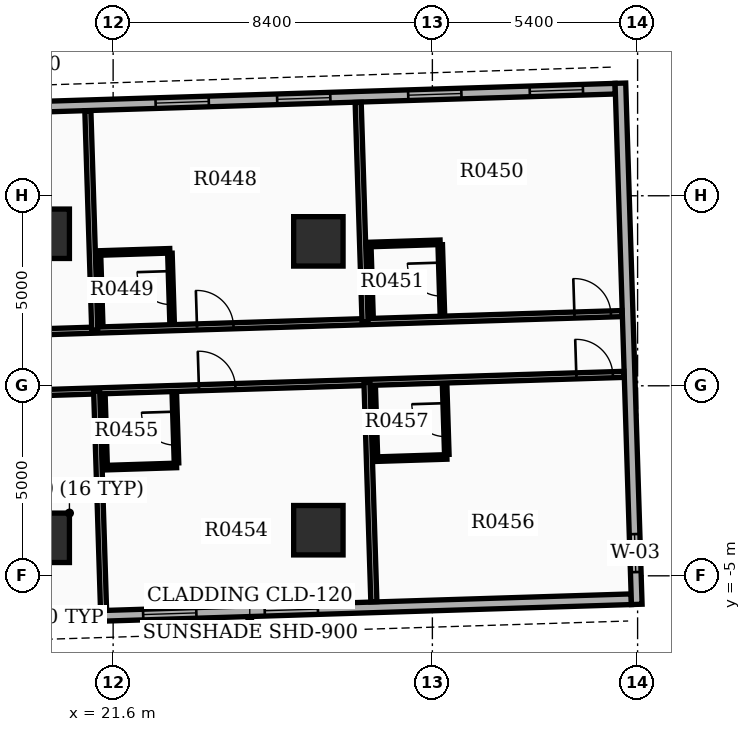
"""IFC4 building model, lengths in metres.
Left out: names, types, materials, properties, quantities, classifications, styles, units other than length and angle.
Written with IfcOpenShell. Run it as: python <this file> out.ifc"""

import sys

from ifc_helpers import new_model, si_unit, direction, frame, frame_2d, origin, origin_2d, place, context, subcontext, project, spatial, rectangle, extrude, element, fill, save


model = new_model("IFC4")
c1 = context("Model", 3, precision=1e-05, world=origin(), true_north=direction((0.0, 1.0)))
c2 = subcontext(c1, "Body", "Model", "MODEL_VIEW")
j1 = project(units=[si_unit("LENGTHUNIT", "METRE"), si_unit("PLANEANGLEUNIT", "RADIAN")], contexts=[c1])
p1 = place(None, origin())
s1 = spatial("IfcSite", under=j1, at=p1, CompositionType="ELEMENT")
p2 = place(p1, origin())
s2 = spatial("IfcBuilding", under=s1, at=p2, CompositionType="ELEMENT")
p3 = place(p2, frame((0.0, 0.0, 31.5)))
s3 = spatial("IfcBuildingStorey", under=s2, at=p3, CompositionType="ELEMENT", Elevation=31.5)
for number, where, z_axis, x_axis in (
    (1, (19.8, -4.0, 0.0), (0.0, 0.0, 1.0), (1.0, 0.0, 0.0)),
    (2, (19.8, 4.0, 0.0), (0.0, 0.0, 1.0), (1.0, 0.0, 0.0)),
    (3, (27.0, -3.8, 0.0), (0.0, 0.0, 1.0), (1.0, 0.0, 0.0)),
    (4, (27.0, 3.8, 0.0), (0.0, 0.0, 1.0), (1.0, 0.0, 0.0)),
):
    element("IfcColumn", number, at=place(p3, frame(where, z_axis=z_axis, x_axis=x_axis)), inside=s3, PredefinedType="COLUMN", context=c2, shape_type="SweptSolid", body=[
        extrude(rectangle(XDim=1.3, YDim=1.3, at=origin_2d()), origin(), (0.0, 0.0, 1.0), 3.9),
    ])
p4 = place(p3, frame((15.144, -6.247, 0.0), z_axis=(0.0, 0.0, 1.0), x_axis=(0.999506955354, 0.031398187845, 0.0)))
e5 = element("IfcWall", 5, at=p4, inside=s3, PredefinedType="STANDARD", context=c2, shape_type="SweptSolid", body=[
    extrude(rectangle(XDim=20.1, YDim=0.28, at=frame_2d((10.05, 0.0))), origin(), (0.0, 0.0, 1.0), 2.91),
])
p5 = place(p4, frame((0.85, 0.0, 0.8)))
e6 = element("IfcOpeningElement", 6, at=p5, cuts=e5, PredefinedType="OPENING", context=c2, shape_type="SweptSolid", body=[
    extrude(rectangle(XDim=1.4, YDim=1.6, at=frame_2d((0.7, 0.8))), frame((0.0, 0.15, 0.0), z_axis=(0.0, -1.0, 0.0), x_axis=(1.0, 0.0, 0.0)), (0.0, 0.0, 1.0), 0.3),
])
p6 = place(p4, frame((4.05, 0.0, 0.8)))
e7 = element("IfcOpeningElement", 7, at=p6, cuts=e5, PredefinedType="OPENING", context=c2, shape_type="SweptSolid", body=[
    extrude(rectangle(XDim=1.4, YDim=1.6, at=frame_2d((0.7, 0.8))), frame((0.0, 0.15, 0.0), z_axis=(0.0, -1.0, 0.0), x_axis=(1.0, 0.0, 0.0)), (0.0, 0.0, 1.0), 0.3),
])
p7 = place(p4, frame((7.25, 0.0, 0.8)))
e8 = element("IfcOpeningElement", 8, at=p7, cuts=e5, PredefinedType="OPENING", context=c2, shape_type="SweptSolid", body=[
    extrude(rectangle(XDim=1.4, YDim=1.6, at=frame_2d((0.7, 0.8))), frame((0.0, 0.15, 0.0), z_axis=(0.0, -1.0, 0.0), x_axis=(1.0, 0.0, 0.0)), (0.0, 0.0, 1.0), 0.3),
])
p8 = place(p4, frame((10.45, 0.0, 0.8)))
e9 = element("IfcOpeningElement", 9, at=p8, cuts=e5, PredefinedType="OPENING", context=c2, shape_type="SweptSolid", body=[
    extrude(rectangle(XDim=1.4, YDim=1.6, at=frame_2d((0.7, 0.8))), frame((0.0, 0.15, 0.0), z_axis=(0.0, -1.0, 0.0), x_axis=(1.0, 0.0, 0.0)), (0.0, 0.0, 1.0), 0.3),
])
p9 = place(p3, frame((34.812, 7.817, 0.0), z_axis=(0.0, 0.0, 1.0), x_axis=(-0.999506574096, -0.031410322165, 0.0)))
e10 = element("IfcWall", 10, at=p9, inside=s3, PredefinedType="STANDARD", context=c2, shape_type="SweptSolid", body=[
    extrude(rectangle(XDim=20.1, YDim=0.28, at=frame_2d((10.05, 0.0))), origin(), (0.0, 0.0, 1.0), 2.91),
])
p10 = place(p9, frame((0.85, 0.0, 0.8)))
e11 = element("IfcOpeningElement", 11, at=p10, cuts=e10, PredefinedType="OPENING", context=c2, shape_type="SweptSolid", body=[
    extrude(rectangle(XDim=1.4, YDim=1.6, at=frame_2d((0.7, 0.8))), frame((0.0, 0.15, 0.0), z_axis=(0.0, -1.0, 0.0), x_axis=(1.0, 0.0, 0.0)), (0.0, 0.0, 1.0), 0.3),
])
p11 = place(p9, frame((4.05, 0.0, 0.8)))
e12 = element("IfcOpeningElement", 12, at=p11, cuts=e10, PredefinedType="OPENING", context=c2, shape_type="SweptSolid", body=[
    extrude(rectangle(XDim=1.4, YDim=1.6, at=frame_2d((0.7, 0.8))), frame((0.0, 0.15, 0.0), z_axis=(0.0, -1.0, 0.0), x_axis=(1.0, 0.0, 0.0)), (0.0, 0.0, 1.0), 0.3),
])
p12 = place(p9, frame((7.5, 0.0, 0.8)))
e13 = element("IfcOpeningElement", 13, at=p12, cuts=e10, PredefinedType="OPENING", context=c2, shape_type="SweptSolid", body=[
    extrude(rectangle(XDim=1.4, YDim=1.6, at=frame_2d((0.7, 0.8))), frame((0.0, 0.15, 0.0), z_axis=(0.0, -1.0, 0.0), x_axis=(1.0, 0.0, 0.0)), (0.0, 0.0, 1.0), 0.3),
])
p13 = place(p9, frame((10.7, 0.0, 0.8)))
e14 = element("IfcOpeningElement", 14, at=p13, cuts=e10, PredefinedType="OPENING", context=c2, shape_type="SweptSolid", body=[
    extrude(rectangle(XDim=1.4, YDim=1.6, at=frame_2d((0.7, 0.8))), frame((0.0, 0.15, 0.0), z_axis=(0.0, -1.0, 0.0), x_axis=(1.0, 0.0, 0.0)), (0.0, 0.0, 1.0), 0.3),
])
p14 = place(p9, frame((15.0, 0.0, 0.0)))
e15 = element("IfcOpeningElement", 15, at=p14, cuts=e10, PredefinedType="OPENING", context=c2, shape_type="SweptSolid", body=[
    extrude(rectangle(XDim=0.96, YDim=2.1, at=frame_2d((0.48, 1.05))), frame((0.0, 0.15, 0.0), z_axis=(0.0, -1.0, 0.0), x_axis=(1.0, 0.0, 0.0)), (0.0, 0.0, 1.0), 0.3),
])
p15 = place(p3, frame((35.378, -5.752, 0.0), z_axis=(0.0, 0.0, 1.0), x_axis=(-0.031406966164, 0.999506679556, 0.0)))
e16 = element("IfcWall", 16, at=p15, inside=s3, PredefinedType="STANDARD", context=c2, shape_type="SweptSolid", body=[
    extrude(rectangle(XDim=13.72, YDim=0.28, at=frame_2d((6.86, 0.0))), origin(), (0.0, 0.0, 1.0), 2.91),
])
p16 = place(p15, frame((0.85, 0.0, 0.85)))
e17 = element("IfcOpeningElement", 17, at=p16, cuts=e16, PredefinedType="OPENING", context=c2, shape_type="SweptSolid", body=[
    extrude(rectangle(XDim=1.0, YDim=1.5, at=frame_2d((0.5, 0.75))), frame((0.0, 0.15, 0.0), z_axis=(0.0, -1.0, 0.0), x_axis=(1.0, 0.0, 0.0)), (0.0, 0.0, 1.0), 0.3),
])
p17 = place(p3, frame((14.817, 1.266, 0.0), z_axis=(0.0, 0.0, 1.0), x_axis=(0.9995067864, 0.031403565719, 0.0)))
e18 = element("IfcWall", 18, at=p17, inside=s3, PredefinedType="PARTITIONING", context=c2, shape_type="SweptSolid", body=[
    extrude(rectangle(XDim=20.182, YDim=0.16, at=frame_2d((10.091, 0.0))), origin(), (0.0, 0.0, 1.0), 2.9),
])
p18 = place(p17, frame((2.61, 0.0, 0.0)))
e19 = element("IfcOpeningElement", 19, at=p18, cuts=e18, PredefinedType="OPENING", context=c2, shape_type="SweptSolid", body=[
    extrude(rectangle(XDim=0.96, YDim=2.15, at=frame_2d((0.48, 1.075))), frame((0.0, 0.09, 0.0), z_axis=(0.0, -1.0, 0.0), x_axis=(1.0, 0.0, 0.0)), (0.0, 0.0, 1.0), 0.18),
])
p19 = place(p17, frame((8.994, 0.0, 0.0)))
e20 = element("IfcOpeningElement", 20, at=p19, cuts=e18, PredefinedType="OPENING", context=c2, shape_type="SweptSolid", body=[
    extrude(rectangle(XDim=0.96, YDim=2.15, at=frame_2d((0.48, 1.075))), frame((0.0, 0.09, 0.0), z_axis=(0.0, -1.0, 0.0), x_axis=(1.0, 0.0, 0.0)), (0.0, 0.0, 1.0), 0.18),
])
p20 = place(p17, frame((18.93, 0.0, 0.0)))
e21 = element("IfcOpeningElement", 21, at=p20, cuts=e18, PredefinedType="OPENING", context=c2, shape_type="SweptSolid", body=[
    extrude(rectangle(XDim=0.96, YDim=2.15, at=frame_2d((0.48, 1.075))), frame((0.0, 0.09, 0.0), z_axis=(0.0, -1.0, 0.0), x_axis=(1.0, 0.0, 0.0)), (0.0, 0.0, 1.0), 0.18),
])
p21 = place(p3, frame((21.116, 1.464, 0.0), z_axis=(0.0, 0.0, 1.0), x_axis=(-0.031427548972, 0.999506032581, 0.0)))
e22 = element("IfcWall", 22, at=p21, inside=s3, PredefinedType="PARTITIONING", context=c2, shape_type="SweptSolid", body=[
    extrude(rectangle(XDim=5.772, YDim=0.16, at=frame_2d((2.886, 0.0))), origin(), (0.0, 0.0, 1.0), 2.9),
])
p22 = place(p3, frame((28.229, 1.688, 0.0), z_axis=(0.0, 0.0, 1.0), x_axis=(-0.031426220357, 0.999506074356, 0.0)))
e23 = element("IfcWall", 23, at=p22, inside=s3, PredefinedType="PARTITIONING", context=c2, shape_type="SweptSolid", body=[
    extrude(rectangle(XDim=5.772, YDim=0.16, at=frame_2d((2.886, 0.0))), origin(), (0.0, 0.0, 1.0), 2.9),
])
p23 = place(p3, frame((23.151, 1.668, 0.0), z_axis=(0.0, 0.0, 1.0), x_axis=(-0.031255692016, 0.999511421504, 0.0)))
e24 = element("IfcWall", 24, at=p23, inside=s3, PredefinedType="PARTITIONING", context=c2, shape_type="SweptSolid", body=[
    extrude(rectangle(XDim=1.82, YDim=0.12, at=frame_2d((0.91, 0.0))), origin(), (0.0, 0.0, 1.0), 2.9),
])
p24 = place(p23, frame((0.47, 0.0, 0.0)))
e25 = element("IfcOpeningElement", 25, at=p24, cuts=e24, PredefinedType="OPENING", context=c2, shape_type="SweptSolid", body=[
    extrude(rectangle(XDim=0.88, YDim=2.1, at=frame_2d((0.44, 1.05))), frame((0.0, 0.07, 0.0), z_axis=(0.0, -1.0, 0.0), x_axis=(1.0, 0.0, 0.0)), (0.0, 0.0, 1.0), 0.14),
])
p25 = place(p3, frame((21.272, 1.609, 0.0), z_axis=(0.0, 0.0, 1.0), x_axis=(-0.031389704724, 0.999507221803, 0.0)))
e26 = element("IfcWall", 26, at=p25, inside=s3, PredefinedType="PARTITIONING", context=c2, shape_type="SweptSolid", body=[
    extrude(rectangle(XDim=1.82, YDim=0.12, at=frame_2d((0.91, 0.0))), origin(), (0.0, 0.0, 1.0), 2.9),
])
p26 = place(p3, frame((21.213, 3.493, 0.0), z_axis=(0.0, 0.0, 1.0), x_axis=(0.999506103526, 0.031425292588, 0.0)))
e27 = element("IfcWall", 27, at=p26, inside=s3, PredefinedType="PARTITIONING", context=c2, shape_type="SweptSolid", body=[
    extrude(rectangle(XDim=1.88, YDim=0.12, at=frame_2d((0.94, 0.0))), origin(), (0.0, 0.0, 1.0), 2.9),
])
p27 = place(p3, frame((30.263, 1.892, 0.0), z_axis=(0.0, 0.0, 1.0), x_axis=(-0.031389704724, 0.999507221803, 0.0)))
e28 = element("IfcWall", 28, at=p27, inside=s3, PredefinedType="PARTITIONING", context=c2, shape_type="SweptSolid", body=[
    extrude(rectangle(XDim=1.82, YDim=0.12, at=frame_2d((0.91, 0.0))), origin(), (0.0, 0.0, 1.0), 2.9),
])
p28 = place(p27, frame((0.47, 0.0, 0.0)))
e29 = element("IfcOpeningElement", 29, at=p28, cuts=e28, PredefinedType="OPENING", context=c2, shape_type="SweptSolid", body=[
    extrude(rectangle(XDim=0.88, YDim=2.1, at=frame_2d((0.44, 1.05))), frame((0.0, 0.07, 0.0), z_axis=(0.0, -1.0, 0.0), x_axis=(1.0, 0.0, 0.0)), (0.0, 0.0, 1.0), 0.14),
])
p29 = place(p3, frame((28.385, 1.833, 0.0), z_axis=(0.0, 0.0, 1.0), x_axis=(-0.031389704724, 0.999507221803, 0.0)))
e30 = element("IfcWall", 30, at=p29, inside=s3, PredefinedType="PARTITIONING", context=c2, shape_type="SweptSolid", body=[
    extrude(rectangle(XDim=1.82, YDim=0.12, at=frame_2d((0.91, 0.0))), origin(), (0.0, 0.0, 1.0), 2.9),
])
p30 = place(p3, frame((28.325, 3.717, 0.0), z_axis=(0.0, 0.0, 1.0), x_axis=(0.999506103526, 0.031425292588, 0.0)))
e31 = element("IfcWall", 31, at=p30, inside=s3, PredefinedType="PARTITIONING", context=c2, shape_type="SweptSolid", body=[
    extrude(rectangle(XDim=1.88, YDim=0.12, at=frame_2d((0.94, 0.0))), origin(), (0.0, 0.0, 1.0), 2.9),
])
p31 = place(p3, frame((14.868, -0.333, 0.0), z_axis=(0.0, 0.0, 1.0), x_axis=(0.99950639469, 0.031416030536, 0.0)))
e32 = element("IfcWall", 32, at=p31, inside=s3, PredefinedType="PARTITIONING", context=c2, shape_type="SweptSolid", body=[
    extrude(rectangle(XDim=20.182, YDim=0.16, at=frame_2d((10.091, 0.0))), origin(), (0.0, 0.0, 1.0), 2.9),
])
p32 = place(p31, frame((2.61, 0.0, 0.0)))
e33 = element("IfcOpeningElement", 33, at=p32, cuts=e32, PredefinedType="OPENING", context=c2, shape_type="SweptSolid", body=[
    extrude(rectangle(XDim=0.96, YDim=2.15, at=frame_2d((0.48, 1.075))), frame((0.0, 0.09, 0.0), z_axis=(0.0, -1.0, 0.0), x_axis=(1.0, 0.0, 0.0)), (0.0, 0.0, 1.0), 0.18),
])
p33 = place(p31, frame((8.994, 0.0, 0.0)))
e34 = element("IfcOpeningElement", 34, at=p33, cuts=e32, PredefinedType="OPENING", context=c2, shape_type="SweptSolid", body=[
    extrude(rectangle(XDim=0.96, YDim=2.15, at=frame_2d((0.48, 1.075))), frame((0.0, 0.09, 0.0), z_axis=(0.0, -1.0, 0.0), x_axis=(1.0, 0.0, 0.0)), (0.0, 0.0, 1.0), 0.18),
])
p34 = place(p31, frame((18.93, 0.0, 0.0)))
e35 = element("IfcOpeningElement", 35, at=p34, cuts=e32, PredefinedType="OPENING", context=c2, shape_type="SweptSolid", body=[
    extrude(rectangle(XDim=0.96, YDim=2.15, at=frame_2d((0.48, 1.075))), frame((0.0, 0.09, 0.0), z_axis=(0.0, -1.0, 0.0), x_axis=(1.0, 0.0, 0.0)), (0.0, 0.0, 1.0), 0.18),
])
p35 = place(p3, frame((21.167, -0.135, 0.0), z_axis=(0.0, 0.0, 1.0), x_axis=(0.031385292484, -0.999507360361, 0.0)))
e36 = element("IfcWall", 36, at=p35, inside=s3, PredefinedType="PARTITIONING", context=c2, shape_type="SweptSolid", body=[
    extrude(rectangle(XDim=5.772, YDim=0.16, at=frame_2d((2.886, 0.0))), origin(), (0.0, 0.0, 1.0), 2.9),
])
p36 = place(p3, frame((28.279, 0.088, 0.0), z_axis=(0.0, 0.0, 1.0), x_axis=(0.031383965651, -0.999507402024, 0.0)))
e37 = element("IfcWall", 37, at=p36, inside=s3, PredefinedType="PARTITIONING", context=c2, shape_type="SweptSolid", body=[
    extrude(rectangle(XDim=5.772, YDim=0.16, at=frame_2d((2.886, 0.0))), origin(), (0.0, 0.0, 1.0), 2.9),
])
p37 = place(p3, frame((23.267, -2.03, 0.0), z_axis=(0.0, 0.0, 1.0), x_axis=(-0.031255692016, 0.999511421504, 0.0)))
e38 = element("IfcWall", 38, at=p37, inside=s3, PredefinedType="PARTITIONING", context=c2, shape_type="SweptSolid", body=[
    extrude(rectangle(XDim=1.82, YDim=0.12, at=frame_2d((0.91, 0.0))), origin(), (0.0, 0.0, 1.0), 2.9),
])
p38 = place(p37, frame((0.47, 0.0, 0.0)))
e39 = element("IfcOpeningElement", 39, at=p38, cuts=e38, PredefinedType="OPENING", context=c2, shape_type="SweptSolid", body=[
    extrude(rectangle(XDim=0.88, YDim=2.1, at=frame_2d((0.44, 1.05))), frame((0.0, 0.07, 0.0), z_axis=(0.0, -1.0, 0.0), x_axis=(1.0, 0.0, 0.0)), (0.0, 0.0, 1.0), 0.14),
])
p39 = place(p3, frame((21.388, -2.089, 0.0), z_axis=(0.0, 0.0, 1.0), x_axis=(-0.031389704724, 0.999507221803, 0.0)))
e40 = element("IfcWall", 40, at=p39, inside=s3, PredefinedType="PARTITIONING", context=c2, shape_type="SweptSolid", body=[
    extrude(rectangle(XDim=1.82, YDim=0.12, at=frame_2d((0.91, 0.0))), origin(), (0.0, 0.0, 1.0), 2.9),
])
p40 = place(p3, frame((21.39, -2.154, 0.0), z_axis=(0.0, 0.0, 1.0), x_axis=(0.999506103526, 0.031425292588, 0.0)))
e41 = element("IfcWall", 41, at=p40, inside=s3, PredefinedType="PARTITIONING", context=c2, shape_type="SweptSolid", body=[
    extrude(rectangle(XDim=1.88, YDim=0.12, at=frame_2d((0.94, 0.0))), origin(), (0.0, 0.0, 1.0), 2.9),
])
p41 = place(p3, frame((30.38, -1.807, 0.0), z_axis=(0.0, 0.0, 1.0), x_axis=(-0.031389704724, 0.999507221803, 0.0)))
e42 = element("IfcWall", 42, at=p41, inside=s3, PredefinedType="PARTITIONING", context=c2, shape_type="SweptSolid", body=[
    extrude(rectangle(XDim=1.82, YDim=0.12, at=frame_2d((0.91, 0.0))), origin(), (0.0, 0.0, 1.0), 2.9),
])
p42 = place(p41, frame((0.47, 0.0, 0.0)))
e43 = element("IfcOpeningElement", 43, at=p42, cuts=e42, PredefinedType="OPENING", context=c2, shape_type="SweptSolid", body=[
    extrude(rectangle(XDim=0.88, YDim=2.1, at=frame_2d((0.44, 1.05))), frame((0.0, 0.07, 0.0), z_axis=(0.0, -1.0, 0.0), x_axis=(1.0, 0.0, 0.0)), (0.0, 0.0, 1.0), 0.14),
])
p43 = place(p3, frame((28.501, -1.866, 0.0), z_axis=(0.0, 0.0, 1.0), x_axis=(-0.031389704724, 0.999507221803, 0.0)))
e44 = element("IfcWall", 44, at=p43, inside=s3, PredefinedType="PARTITIONING", context=c2, shape_type="SweptSolid", body=[
    extrude(rectangle(XDim=1.82, YDim=0.12, at=frame_2d((0.91, 0.0))), origin(), (0.0, 0.0, 1.0), 2.9),
])
p44 = place(p3, frame((28.503, -1.931, 0.0), z_axis=(0.0, 0.0, 1.0), x_axis=(0.999506103526, 0.031425292588, 0.0)))
e45 = element("IfcWall", 45, at=p44, inside=s3, PredefinedType="PARTITIONING", context=c2, shape_type="SweptSolid", body=[
    extrude(rectangle(XDim=1.88, YDim=0.12, at=frame_2d((0.94, 0.0))), origin(), (0.0, 0.0, 1.0), 2.9),
])
p45 = place(p6, origin())
e46 = element("IfcWindow", 46, at=p45, inside=s3, PartitioningType="SINGLE_PANEL", PredefinedType="WINDOW", context=c2, shape_type="SweptSolid", body=[
    extrude(rectangle(XDim=1.4, YDim=1.6, at=frame_2d((0.7, 0.8))), frame((0.0, 0.03, 0.0), z_axis=(0.0, -1.0, 0.0), x_axis=(1.0, 0.0, 0.0)), (0.0, 0.0, 1.0), 0.06),
])
fill(e7, e46)
p46 = place(p7, origin())
e47 = element("IfcWindow", 47, at=p46, inside=s3, PartitioningType="SINGLE_PANEL", PredefinedType="WINDOW", context=c2, shape_type="SweptSolid", body=[
    extrude(rectangle(XDim=1.4, YDim=1.6, at=frame_2d((0.7, 0.8))), frame((0.0, 0.03, 0.0), z_axis=(0.0, -1.0, 0.0), x_axis=(1.0, 0.0, 0.0)), (0.0, 0.0, 1.0), 0.06),
])
fill(e8, e47)
p47 = place(p8, origin())
e48 = element("IfcWindow", 48, at=p47, inside=s3, PartitioningType="SINGLE_PANEL", PredefinedType="WINDOW", context=c2, shape_type="SweptSolid", body=[
    extrude(rectangle(XDim=1.4, YDim=1.6, at=frame_2d((0.7, 0.8))), frame((0.0, 0.03, 0.0), z_axis=(0.0, -1.0, 0.0), x_axis=(1.0, 0.0, 0.0)), (0.0, 0.0, 1.0), 0.06),
])
fill(e9, e48)
p48 = place(p10, origin())
e49 = element("IfcWindow", 49, at=p48, inside=s3, PartitioningType="SINGLE_PANEL", PredefinedType="WINDOW", context=c2, shape_type="SweptSolid", body=[
    extrude(rectangle(XDim=1.4, YDim=1.6, at=frame_2d((0.7, 0.8))), frame((0.0, 0.03, 0.0), z_axis=(0.0, -1.0, 0.0), x_axis=(1.0, 0.0, 0.0)), (0.0, 0.0, 1.0), 0.06),
])
fill(e11, e49)
p49 = place(p11, origin())
e50 = element("IfcWindow", 50, at=p49, inside=s3, PartitioningType="SINGLE_PANEL", PredefinedType="WINDOW", context=c2, shape_type="SweptSolid", body=[
    extrude(rectangle(XDim=1.4, YDim=1.6, at=frame_2d((0.7, 0.8))), frame((0.0, 0.03, 0.0), z_axis=(0.0, -1.0, 0.0), x_axis=(1.0, 0.0, 0.0)), (0.0, 0.0, 1.0), 0.06),
])
fill(e12, e50)
p50 = place(p12, origin())
e51 = element("IfcWindow", 51, at=p50, inside=s3, PartitioningType="SINGLE_PANEL", PredefinedType="WINDOW", context=c2, shape_type="SweptSolid", body=[
    extrude(rectangle(XDim=1.4, YDim=1.6, at=frame_2d((0.7, 0.8))), frame((0.0, 0.03, 0.0), z_axis=(0.0, -1.0, 0.0), x_axis=(1.0, 0.0, 0.0)), (0.0, 0.0, 1.0), 0.06),
])
fill(e13, e51)
p51 = place(p13, origin())
e52 = element("IfcWindow", 52, at=p51, inside=s3, PartitioningType="SINGLE_PANEL", PredefinedType="WINDOW", context=c2, shape_type="SweptSolid", body=[
    extrude(rectangle(XDim=1.4, YDim=1.6, at=frame_2d((0.7, 0.8))), frame((0.0, 0.03, 0.0), z_axis=(0.0, -1.0, 0.0), x_axis=(1.0, 0.0, 0.0)), (0.0, 0.0, 1.0), 0.06),
])
fill(e14, e52)
p52 = place(p16, origin())
e53 = element("IfcWindow", 53, at=p52, inside=s3, PartitioningType="SINGLE_PANEL", PredefinedType="WINDOW", context=c2, shape_type="SweptSolid", body=[
    extrude(rectangle(XDim=1.0, YDim=1.5, at=frame_2d((0.5, 0.75))), frame((0.0, 0.03, 0.0), z_axis=(0.0, -1.0, 0.0), x_axis=(1.0, 0.0, 0.0)), (0.0, 0.0, 1.0), 0.06),
])
fill(e17, e53)
p53 = place(p19, origin())
e54 = element("IfcDoor", 54, at=p53, inside=s3, OperationType="SINGLE_SWING_LEFT", PredefinedType="DOOR", context=c2, shape_type="SweptSolid", body=[
    extrude(rectangle(XDim=0.96, YDim=2.15, at=frame_2d((0.48, 1.075))), frame((0.0, 0.025, 0.0), z_axis=(0.0, -1.0, 0.0), x_axis=(1.0, 0.0, 0.0)), (0.0, 0.0, 1.0), 0.05),
])
fill(e20, e54)
p54 = place(p24, origin())
e55 = element("IfcDoor", 55, at=p54, inside=s3, OperationType="SINGLE_SWING_RIGHT", PredefinedType="DOOR", context=c2, shape_type="SweptSolid", body=[
    extrude(rectangle(XDim=0.88, YDim=2.1, at=frame_2d((0.44, 1.05))), frame((0.0, 0.025, 0.0), z_axis=(0.0, -1.0, 0.0), x_axis=(1.0, 0.0, 0.0)), (0.0, 0.0, 1.0), 0.05),
])
fill(e25, e55)
p55 = place(p20, origin())
e56 = element("IfcDoor", 56, at=p55, inside=s3, OperationType="SINGLE_SWING_LEFT", PredefinedType="DOOR", context=c2, shape_type="SweptSolid", body=[
    extrude(rectangle(XDim=0.96, YDim=2.15, at=frame_2d((0.48, 1.075))), frame((0.0, 0.025, 0.0), z_axis=(0.0, -1.0, 0.0), x_axis=(1.0, 0.0, 0.0)), (0.0, 0.0, 1.0), 0.05),
])
fill(e21, e56)
p56 = place(p28, origin())
e57 = element("IfcDoor", 57, at=p56, inside=s3, OperationType="SINGLE_SWING_RIGHT", PredefinedType="DOOR", context=c2, shape_type="SweptSolid", body=[
    extrude(rectangle(XDim=0.88, YDim=2.1, at=frame_2d((0.44, 1.05))), frame((0.0, 0.025, 0.0), z_axis=(0.0, -1.0, 0.0), x_axis=(1.0, 0.0, 0.0)), (0.0, 0.0, 1.0), 0.05),
])
fill(e29, e57)
p57 = place(p33, origin())
e58 = element("IfcDoor", 58, at=p57, inside=s3, OperationType="SINGLE_SWING_LEFT", PredefinedType="DOOR", context=c2, shape_type="SweptSolid", body=[
    extrude(rectangle(XDim=0.96, YDim=2.15, at=frame_2d((0.48, 1.075))), frame((0.0, 0.025, 0.0), z_axis=(0.0, -1.0, 0.0), x_axis=(1.0, 0.0, 0.0)), (0.0, 0.0, 1.0), 0.05),
])
fill(e34, e58)
p58 = place(p38, origin())
e59 = element("IfcDoor", 59, at=p58, inside=s3, OperationType="SINGLE_SWING_RIGHT", PredefinedType="DOOR", context=c2, shape_type="SweptSolid", body=[
    extrude(rectangle(XDim=0.88, YDim=2.1, at=frame_2d((0.44, 1.05))), frame((0.0, 0.025, 0.0), z_axis=(0.0, -1.0, 0.0), x_axis=(1.0, 0.0, 0.0)), (0.0, 0.0, 1.0), 0.05),
])
fill(e39, e59)
p59 = place(p34, origin())
e60 = element("IfcDoor", 60, at=p59, inside=s3, OperationType="SINGLE_SWING_LEFT", PredefinedType="DOOR", context=c2, shape_type="SweptSolid", body=[
    extrude(rectangle(XDim=0.96, YDim=2.15, at=frame_2d((0.48, 1.075))), frame((0.0, 0.025, 0.0), z_axis=(0.0, -1.0, 0.0), x_axis=(1.0, 0.0, 0.0)), (0.0, 0.0, 1.0), 0.05),
])
fill(e35, e60)
p60 = place(p42, origin())
e61 = element("IfcDoor", 61, at=p60, inside=s3, OperationType="SINGLE_SWING_RIGHT", PredefinedType="DOOR", context=c2, shape_type="SweptSolid", body=[
    extrude(rectangle(XDim=0.88, YDim=2.1, at=frame_2d((0.44, 1.05))), frame((0.0, 0.025, 0.0), z_axis=(0.0, -1.0, 0.0), x_axis=(1.0, 0.0, 0.0)), (0.0, 0.0, 1.0), 0.05),
])
fill(e43, e61)
save(model, sys.argv[1])
